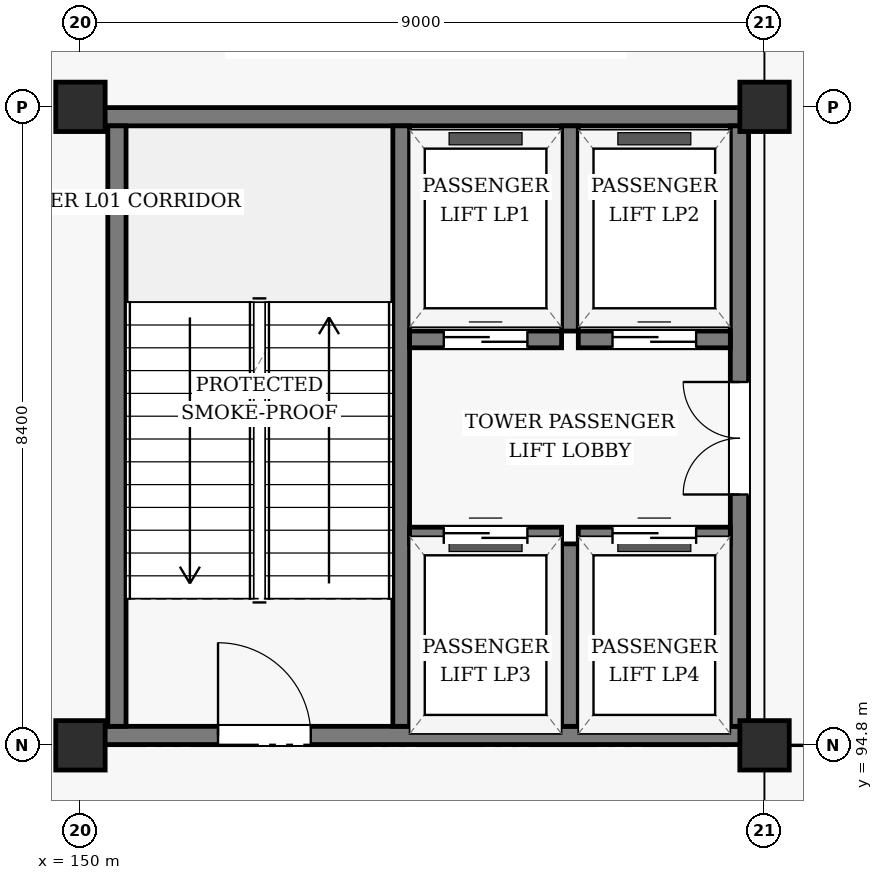
"""IFC4 building model, lengths in metres.
Left out: names, types, materials, properties, quantities, classifications, styles, units other than length and angle.
Written with IfcOpenShell. Run it as: python <this file> out.ifc"""

import sys

from ifc_helpers import new_model, si_unit, direction, frame, frame_2d, origin, origin_2d, place, context, subcontext, project, spatial, rectangle, hollow_rectangle, extrude, element, fill, save


model = new_model("IFC4")
c1 = context("Model", 3, precision=1e-05, world=origin(), true_north=direction((0.0, 1.0)))
c2 = subcontext(c1, "Body", "Model", "MODEL_VIEW")
j1 = project(units=[si_unit("LENGTHUNIT", "METRE"), si_unit("PLANEANGLEUNIT", "RADIAN")], contexts=[c1])
p1 = place(None, origin())
s1 = spatial("IfcSite", under=j1, at=p1, CompositionType="ELEMENT")
p2 = place(p1, origin())
s2 = spatial("IfcBuilding", under=s1, at=p2, CompositionType="ELEMENT")
p3 = place(p2, frame((0.0, 0.0, 4.8)))
s3 = spatial("IfcBuildingStorey", under=s2, at=p3, CompositionType="ELEMENT", Elevation=4.8)
for number, where, z_axis, x_axis in (
    (1, (150.0, 94.8, 0.0), (0.0, 0.0, 1.0), (1.0, 0.0, 0.0)),
    (2, (150.0, 103.2, 0.0), (0.0, 0.0, 1.0), (1.0, 0.0, 0.0)),
    (3, (159.0, 94.8, 0.0), (0.0, 0.0, 1.0), (1.0, 0.0, 0.0)),
    (4, (159.0, 103.2, 0.0), (0.0, 0.0, 1.0), (1.0, 0.0, 0.0)),
):
    element("IfcColumn", number, at=place(p3, frame(where, z_axis=z_axis, x_axis=x_axis)), inside=s3, PredefinedType="COLUMN", context=c2, shape_type="SweptSolid", body=[
        extrude(hollow_rectangle(XDim=0.65, YDim=0.65, WallThickness=0.028, InnerFilletRadius=0.028, OuterFilletRadius=0.056, at=origin_2d()), origin(), (0.0, 0.0, 1.0), 4.2),
    ])
p4 = place(p3, frame((150.02, 94.93, 0.0), z_axis=(0.0, 0.0, 1.0), x_axis=(1.0, 0.0, 0.0)))
e5 = element("IfcWall", 5, at=p4, inside=s3, PredefinedType="SHEAR", context=c2, shape_type="SweptSolid", body=[
    extrude(rectangle(XDim=8.77, YDim=0.24, at=frame_2d((4.385, 0.0))), origin(), (0.0, 0.0, 1.0), 3.955),
])
p5 = place(p4, frame((1.79, 0.0, 0.0)))
e6 = element("IfcOpeningElement", 6, at=p5, cuts=e5, PredefinedType="OPENING", context=c2, shape_type="SweptSolid", body=[
    extrude(rectangle(XDim=1.22, YDim=2.18, at=frame_2d((0.61, 1.09))), frame((0.0, 0.13, 0.0), z_axis=(0.0, -1.0, 0.0), x_axis=(1.0, 0.0, 0.0)), (0.0, 0.0, 1.0), 0.26),
])
p6 = place(p3, frame((150.02, 103.07, 0.0), z_axis=(0.0, 0.0, 1.0), x_axis=(1.0, 0.0, 0.0)))
e7 = element("IfcWall", 7, at=p6, inside=s3, PredefinedType="SHEAR", context=c2, shape_type="SweptSolid", body=[
    extrude(rectangle(XDim=8.77, YDim=0.24, at=frame_2d((4.385, 0.0))), origin(), (0.0, 0.0, 1.0), 3.955),
])
p7 = place(p3, frame((150.48, 95.05, 0.0), z_axis=(0.0, 0.0, 1.0), x_axis=(0.0, 1.0, 0.0)))
e8 = element("IfcWall", 8, at=p7, inside=s3, PredefinedType="SHEAR", context=c2, shape_type="SweptSolid", body=[
    extrude(rectangle(XDim=7.9, YDim=0.24, at=frame_2d((3.95, 0.0))), origin(), (0.0, 0.0, 1.0), 3.955),
])
p8 = place(p3, frame((154.22, 95.05, 0.0), z_axis=(0.0, 0.0, 1.0), x_axis=(0.0, 1.0, 0.0)))
e9 = element("IfcWall", 9, at=p8, inside=s3, PredefinedType="SHEAR", context=c2, shape_type="SweptSolid", body=[
    extrude(rectangle(XDim=7.9, YDim=0.22, at=frame_2d((3.95, 0.0))), origin(), (0.0, 0.0, 1.0), 3.955),
])
p9 = place(p3, frame((158.67, 95.05, 0.0), z_axis=(0.0, 0.0, 1.0), x_axis=(0.0, 1.0, 0.0)))
e10 = element("IfcWall", 10, at=p9, inside=s3, PredefinedType="SHEAR", context=c2, shape_type="SweptSolid", body=[
    extrude(rectangle(XDim=7.9, YDim=0.24, at=frame_2d((3.95, 0.0))), origin(), (0.0, 0.0, 1.0), 3.955),
])
p10 = place(p9, frame((3.05, 0.0, 0.0)))
e11 = element("IfcOpeningElement", 11, at=p10, cuts=e10, PredefinedType="OPENING", context=c2, shape_type="SweptSolid", body=[
    extrude(rectangle(XDim=1.48, YDim=2.22, at=frame_2d((0.74, 1.11))), frame((0.0, 0.13, 0.0), z_axis=(0.0, -1.0, 0.0), x_axis=(1.0, 0.0, 0.0)), (0.0, 0.0, 1.0), 0.26),
])
p11 = place(p3, frame((156.44, 100.25, 0.0), z_axis=(0.0, 0.0, 1.0), x_axis=(0.0, 1.0, 0.0)))
e12 = element("IfcWall", 12, at=p11, inside=s3, PredefinedType="SHEAR", context=c2, shape_type="SweptSolid", body=[
    extrude(rectangle(XDim=2.7, YDim=0.22, at=frame_2d((1.35, 0.0))), origin(), (0.0, 0.0, 1.0), 3.955),
])
p12 = place(p3, frame((154.33, 100.14, 0.0), z_axis=(0.0, 0.0, 1.0), x_axis=(1.0, 0.0, 0.0)))
e13 = element("IfcWall", 13, at=p12, inside=s3, PredefinedType="SHEAR", context=c2, shape_type="SweptSolid", body=[
    extrude(rectangle(XDim=2.0, YDim=0.22, at=frame_2d((1.0, 0.0))), origin(), (0.0, 0.0, 1.0), 3.955),
])
p13 = place(p12, frame((0.45, 0.0, 0.0)))
e14 = element("IfcOpeningElement", 14, at=p13, cuts=e13, PredefinedType="OPENING", context=c2, shape_type="SweptSolid", body=[
    extrude(rectangle(XDim=1.1, YDim=2.15, at=frame_2d((0.55, 1.075))), frame((0.0, 0.12, 0.0), z_axis=(0.0, -1.0, 0.0), x_axis=(1.0, 0.0, 0.0)), (0.0, 0.0, 1.0), 0.24),
])
p14 = place(p3, frame((156.55, 100.14, 0.0), z_axis=(0.0, 0.0, 1.0), x_axis=(1.0, 0.0, 0.0)))
e15 = element("IfcWall", 15, at=p14, inside=s3, PredefinedType="SHEAR", context=c2, shape_type="SweptSolid", body=[
    extrude(rectangle(XDim=2.0, YDim=0.22, at=frame_2d((1.0, 0.0))), origin(), (0.0, 0.0, 1.0), 3.955),
])
p15 = place(p14, frame((0.45, 0.0, 0.0)))
e16 = element("IfcOpeningElement", 16, at=p15, cuts=e15, PredefinedType="OPENING", context=c2, shape_type="SweptSolid", body=[
    extrude(rectangle(XDim=1.1, YDim=2.15, at=frame_2d((0.55, 1.075))), frame((0.0, 0.12, 0.0), z_axis=(0.0, -1.0, 0.0), x_axis=(1.0, 0.0, 0.0)), (0.0, 0.0, 1.0), 0.24),
])
p16 = place(p3, frame((156.44, 95.05, 0.0), z_axis=(0.0, 0.0, 1.0), x_axis=(0.0, 1.0, 0.0)))
e17 = element("IfcWall", 17, at=p16, inside=s3, PredefinedType="SHEAR", context=c2, shape_type="SweptSolid", body=[
    extrude(rectangle(XDim=2.4, YDim=0.22, at=frame_2d((1.2, 0.0))), origin(), (0.0, 0.0, 1.0), 3.955),
])
p17 = place(p3, frame((154.33, 97.56, 0.0), z_axis=(0.0, 0.0, 1.0), x_axis=(1.0, 0.0, 0.0)))
e18 = element("IfcWall", 18, at=p17, inside=s3, PredefinedType="SHEAR", context=c2, shape_type="SweptSolid", body=[
    extrude(rectangle(XDim=2.0, YDim=0.22, at=frame_2d((1.0, 0.0))), origin(), (0.0, 0.0, 1.0), 3.955),
])
p18 = place(p17, frame((0.45, 0.0, 0.0)))
e19 = element("IfcOpeningElement", 19, at=p18, cuts=e18, PredefinedType="OPENING", context=c2, shape_type="SweptSolid", body=[
    extrude(rectangle(XDim=1.1, YDim=2.15, at=frame_2d((0.55, 1.075))), frame((0.0, 0.12, 0.0), z_axis=(0.0, -1.0, 0.0), x_axis=(1.0, 0.0, 0.0)), (0.0, 0.0, 1.0), 0.24),
])
p19 = place(p3, frame((156.55, 97.56, 0.0), z_axis=(0.0, 0.0, 1.0), x_axis=(1.0, 0.0, 0.0)))
e20 = element("IfcWall", 20, at=p19, inside=s3, PredefinedType="SHEAR", context=c2, shape_type="SweptSolid", body=[
    extrude(rectangle(XDim=2.0, YDim=0.22, at=frame_2d((1.0, 0.0))), origin(), (0.0, 0.0, 1.0), 3.955),
])
p20 = place(p19, frame((0.45, 0.0, 0.0)))
e21 = element("IfcOpeningElement", 21, at=p20, cuts=e20, PredefinedType="OPENING", context=c2, shape_type="SweptSolid", body=[
    extrude(rectangle(XDim=1.1, YDim=2.15, at=frame_2d((0.55, 1.075))), frame((0.0, 0.12, 0.0), z_axis=(0.0, -1.0, 0.0), x_axis=(1.0, 0.0, 0.0)), (0.0, 0.0, 1.0), 0.24),
])
p21 = place(p5, origin())
e22 = element("IfcDoor", 22, at=p21, inside=s3, OperationType="SINGLE_SWING_LEFT", PredefinedType="DOOR", context=c2, shape_type="SweptSolid", body=[
    extrude(rectangle(XDim=1.22, YDim=2.18, at=frame_2d((0.61, 1.09))), frame((0.0, 0.025, 0.0), z_axis=(0.0, -1.0, 0.0), x_axis=(1.0, 0.0, 0.0)), (0.0, 0.0, 1.0), 0.05),
])
fill(e6, e22)
p22 = place(p10, origin())
e23 = element("IfcDoor", 23, at=p22, inside=s3, OperationType="DOUBLE_DOOR_SINGLE_SWING", PredefinedType="DOOR", context=c2, shape_type="SweptSolid", body=[
    extrude(rectangle(XDim=1.48, YDim=2.22, at=frame_2d((0.74, 1.11))), frame((0.0, 0.025, 0.0), z_axis=(0.0, -1.0, 0.0), x_axis=(1.0, 0.0, 0.0)), (0.0, 0.0, 1.0), 0.05),
])
fill(e11, e23)
p23 = place(p13, origin())
e24 = element("IfcDoor", 24, at=p23, inside=s3, OperationType="SLIDING_TO_LEFT", PredefinedType="DOOR", context=c2, shape_type="SweptSolid", body=[
    extrude(rectangle(XDim=1.1, YDim=2.15, at=frame_2d((0.55, 1.075))), frame((0.0, 0.025, 0.0), z_axis=(0.0, -1.0, 0.0), x_axis=(1.0, 0.0, 0.0)), (0.0, 0.0, 1.0), 0.05),
])
fill(e14, e24)
p24 = place(p15, origin())
e25 = element("IfcDoor", 25, at=p24, inside=s3, OperationType="SLIDING_TO_LEFT", PredefinedType="DOOR", context=c2, shape_type="SweptSolid", body=[
    extrude(rectangle(XDim=1.1, YDim=2.15, at=frame_2d((0.55, 1.075))), frame((0.0, 0.025, 0.0), z_axis=(0.0, -1.0, 0.0), x_axis=(1.0, 0.0, 0.0)), (0.0, 0.0, 1.0), 0.05),
])
fill(e16, e25)
p25 = place(p18, origin())
e26 = element("IfcDoor", 26, at=p25, inside=s3, OperationType="SLIDING_TO_LEFT", PredefinedType="DOOR", context=c2, shape_type="SweptSolid", body=[
    extrude(rectangle(XDim=1.1, YDim=2.15, at=frame_2d((0.55, 1.075))), frame((0.0, 0.025, 0.0), z_axis=(0.0, -1.0, 0.0), x_axis=(1.0, 0.0, 0.0)), (0.0, 0.0, 1.0), 0.05),
])
fill(e19, e26)
p26 = place(p20, origin())
e27 = element("IfcDoor", 27, at=p26, inside=s3, OperationType="SLIDING_TO_LEFT", PredefinedType="DOOR", context=c2, shape_type="SweptSolid", body=[
    extrude(rectangle(XDim=1.1, YDim=2.15, at=frame_2d((0.55, 1.075))), frame((0.0, 0.025, 0.0), z_axis=(0.0, -1.0, 0.0), x_axis=(1.0, 0.0, 0.0)), (0.0, 0.0, 1.0), 0.05),
])
fill(e21, e27)
save(model, sys.argv[1])
